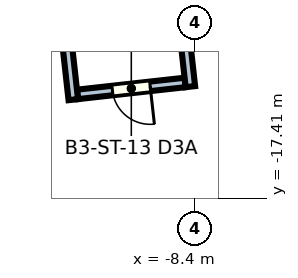
"""IFC4 building model, lengths in metres.
Left out: names, types, materials, properties, quantities, classifications, styles, units other than length and angle.
Written with IfcOpenShell. Run it as: python <this file> out.ifc"""

import sys

from ifc_helpers import new_model, si_unit, direction, frame, frame_2d, origin, place, context, subcontext, project, spatial, rectangle, extrude, element, fill, save


model = new_model("IFC4")
c1 = context("Model", 3, precision=1e-05, world=origin(), true_north=direction((0.0, 1.0)))
c2 = subcontext(c1, "Body", "Model", "MODEL_VIEW")
j1 = project(units=[si_unit("LENGTHUNIT", "METRE"), si_unit("PLANEANGLEUNIT", "RADIAN")], contexts=[c1])
p1 = place(None, origin())
s1 = spatial("IfcSite", under=j1, at=p1, CompositionType="ELEMENT")
p2 = place(p1, origin())
s2 = spatial("IfcBuilding", under=s1, at=p2, CompositionType="ELEMENT")
p3 = place(p2, frame((0.0, 0.0, -13.0)))
s3 = spatial("IfcBuildingStorey", under=s2, at=p3, CompositionType="ELEMENT", Elevation=-13.0)
p4 = place(p3, frame((-8.667, -14.3, 0.0), z_axis=(0.0, 0.0, 1.0), x_axis=(-0.993904609394, -0.110243491536, 0.0)))
e1 = element("IfcWall", 1, at=p4, inside=s3, PredefinedType="SOLIDWALL", context=c2, shape_type="SweptSolid", body=[
    extrude(rectangle(XDim=2.85, YDim=0.25, at=frame_2d((1.425, 0.0))), origin(), (0.0, 0.0, 1.0), 3.7),
])
p5 = place(p4, frame((0.925, 0.0, 0.0)))
e2 = element("IfcOpeningElement", 2, at=p5, cuts=e1, PredefinedType="OPENING", context=c2, shape_type="SweptSolid", body=[
    extrude(rectangle(XDim=1.0, YDim=2.1, at=frame_2d((0.5, 1.05))), frame((0.0, 0.135, 0.0), z_axis=(0.0, -1.0, 0.0), x_axis=(1.0, 0.0, 0.0)), (0.0, 0.0, 1.0), 0.27),
])
p6 = place(p3, frame((-11.61, -14.753, 0.0), z_axis=(0.0, 0.0, 1.0), x_axis=(-0.110310943534, 0.993897125329, 0.0)))
e3 = element("IfcWall", 3, at=p6, inside=s3, PredefinedType="SOLIDWALL", context=c2, shape_type="SweptSolid", body=[
    extrude(rectangle(XDim=6.0, YDim=0.25, at=frame_2d((3.0, 0.0))), origin(), (0.0, 0.0, 1.0), 3.7),
])
p7 = place(p3, frame((-9.22, -8.178, 0.0), z_axis=(0.0, 0.0, 1.0), x_axis=(0.110299055694, -0.993898444668, 0.0)))
e4 = element("IfcWall", 4, at=p7, inside=s3, PredefinedType="SOLIDWALL", context=c2, shape_type="SweptSolid", body=[
    extrude(rectangle(XDim=6.271, YDim=0.25, at=frame_2d((3.135, 0.0))), origin(), (0.0, 0.0, 1.0), 3.7),
])
p8 = place(p5, origin())
e5 = element("IfcDoor", 5, at=p8, inside=s3, PredefinedType="DOOR", context=c2, shape_type="SweptSolid", body=[
    extrude(rectangle(XDim=1.0, YDim=2.1, at=frame_2d((0.5, 1.05))), frame((0.0, 0.025, 0.0), z_axis=(0.0, -1.0, 0.0), x_axis=(1.0, 0.0, 0.0)), (0.0, 0.0, 1.0), 0.05),
])
fill(e2, e5)
save(model, sys.argv[1])
